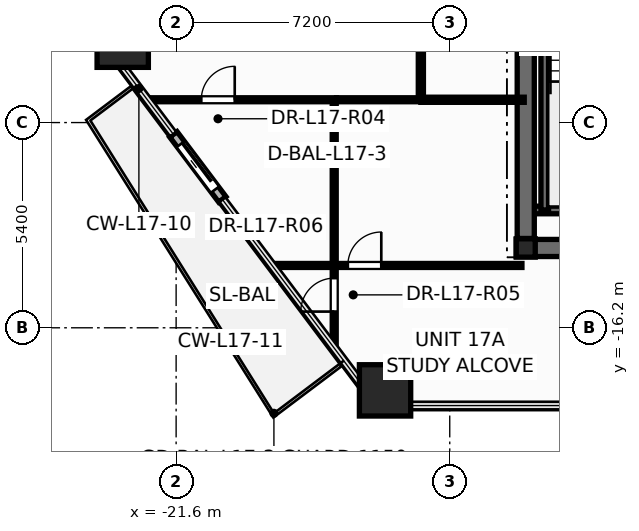
"""IFC4 building model, lengths in metres.
Left out: names, types, materials, properties, quantities, classifications, styles, units other than length and angle.
Written with IfcOpenShell. Run it as: python <this file> out.ifc"""

import sys

from ifc_helpers import new_model, si_unit, direction, frame, frame_2d, origin, origin_2d, place, context, subcontext, project, spatial, rectangle, hollow_rectangle, i_section, extrude, element, fill, save


model = new_model("IFC4")
c1 = context("Model", 3, precision=1e-05, world=origin(), true_north=direction((0.0, 1.0)))
c2 = subcontext(c1, "Body", "Model", "MODEL_VIEW")
j1 = project(units=[si_unit("LENGTHUNIT", "METRE"), si_unit("PLANEANGLEUNIT", "RADIAN")], contexts=[c1])
p1 = place(None, origin())
s1 = spatial("IfcSite", under=j1, at=p1, CompositionType="ELEMENT")
p2 = place(p1, origin())
s2 = spatial("IfcBuilding", under=s1, at=p2, CompositionType="ELEMENT")
p3 = place(p2, frame((0.0, 0.0, 68.4)))
s3 = spatial("IfcBuildingStorey", under=s2, at=p3, CompositionType="ELEMENT", Elevation=68.4)
for number, where, z_axis, x_axis in (
    (1, (-23.005, -8.673, 0.0), (0.0, 0.0, 1.0), (1.0, 0.0, 0.0)),
    (2, (-16.103, -17.847, 0.0), (0.0, 0.0, 1.0), (1.0, 0.0, 0.0)),
):
    element("IfcColumn", number, at=place(p3, frame(where, z_axis=z_axis, x_axis=x_axis)), inside=s3, PredefinedType="COLUMN", context=c2, shape_type="SweptSolid", body=[
        extrude(hollow_rectangle(XDim=1.35, YDim=1.35, WallThickness=0.065, at=origin_2d()), origin(), (0.0, 0.0, 1.0), 3.6),
    ])
p4 = place(p3, frame((-12.4, -14.1, 0.0), z_axis=(0.0, 0.0, 1.0), x_axis=(1.0, 0.0, 0.0)))
e3 = element("IfcColumn", 3, at=p4, inside=s3, PredefinedType="COLUMN", context=c2, shape_type="SweptSolid", body=[
    extrude(i_section(OverallWidth=0.5, OverallDepth=0.482, WebThickness=0.04, FlangeThickness=0.045, at=origin_2d()), origin(), (0.0, 0.0, 1.0), 3.6),
])
p5 = place(p3, frame((-21.671, -11.111, -0.015), z_axis=(0.0, 0.0, 1.0), x_axis=(0.601185740915, -0.799109319756, 0.0)))
e4 = element("IfcWall", 4, at=p5, inside=s3, PredefinedType="STANDARD", context=c2, shape_type="SweptSolid", body=[
    extrude(rectangle(XDim=2.14, YDim=0.24, at=frame_2d((1.07, 0.0))), origin(), (0.0, 0.0, 1.0), 2.728),
])
p6 = place(p5, frame((0.32, 0.0, 0.015)))
e5 = element("IfcOpeningElement", 5, at=p6, cuts=e4, PredefinedType="OPENING", context=c2, shape_type="SweptSolid", body=[
    extrude(rectangle(XDim=1.506, YDim=2.204, at=frame_2d((0.75, 1.102))), frame((0.0, 0.13, 0.0), z_axis=(0.0, -1.0, 0.0), x_axis=(1.0, 0.0, 0.0)), (0.0, 0.0, 1.0), 0.26),
])
p7 = place(p3, frame((-12.65, -14.1, 0.0), z_axis=(0.0, 0.0, 1.0), x_axis=(1.0, 0.0, 0.0)))
e6 = element("IfcWall", 6, at=p7, inside=s3, PredefinedType="SHEAR", context=c2, shape_type="SweptSolid", body=[
    extrude(rectangle(XDim=25.3, YDim=0.45, at=frame_2d((12.65, 0.0))), origin(), (0.0, 0.0, 1.0), 3.6),
])
p8 = place(p3, frame((-12.35, -13.1, 0.0), z_axis=(0.0, 0.0, 1.0), x_axis=(1.0, 0.0, 0.0)))
e7 = element("IfcWall", 7, at=p8, inside=s3, PredefinedType="SOLIDWALL", context=c2, shape_type="SweptSolid", body=[
    extrude(rectangle(XDim=3.87, YDim=0.2, at=frame_2d((1.935, 0.0))), origin(), (0.0, 0.0, 1.0), 3.6),
])
p9 = place(p3, frame((-11.9, -13.1, 0.0), z_axis=(0.0, 0.0, 1.0), x_axis=(0.0, 1.0, 0.0)))
e8 = element("IfcWall", 8, at=p9, inside=s3, PredefinedType="SOLIDWALL", context=c2, shape_type="SweptSolid", body=[
    extrude(rectangle(XDim=7.58, YDim=0.2, at=frame_2d((3.79, 0.0))), origin(), (0.0, 0.0, 1.0), 3.6),
])
p10 = place(p3, frame((-12.4, -13.85, 0.0), z_axis=(0.0, 0.0, 1.0), x_axis=(0.0, 1.0, 0.0)))
e9 = element("IfcWall", 9, at=p10, inside=s3, PredefinedType="SHEAR", context=c2, shape_type="SweptSolid", body=[
    extrude(rectangle(XDim=9.4, YDim=0.45, at=frame_2d((4.7, 0.0))), origin(), (0.0, 0.0, 1.0), 3.6),
])
p11 = place(p3, frame((-19.076, -14.56, 0.0), z_axis=(0.0, 0.0, 1.0), x_axis=(1.0, 0.0, 0.0)))
e10 = element("IfcWall", 10, at=p11, inside=s3, PredefinedType="PARTITIONING", context=c2, shape_type="SweptSolid", body=[
    extrude(rectangle(XDim=6.576, YDim=0.105, at=frame_2d((3.288, 0.0))), origin(), (0.0, 0.0, 1.0), 2.713),
])
p12 = place(p11, frame((1.995, 0.0, 0.0)))
e11 = element("IfcOpeningElement", 11, at=p12, cuts=e10, PredefinedType="OPENING", context=c2, shape_type="SweptSolid", body=[
    extrude(rectangle(XDim=0.886, YDim=2.104, at=frame_2d((0.44, 1.052))), frame((0.0, 0.062, 0.0), z_axis=(0.0, -1.0, 0.0), x_axis=(1.0, 0.0, 0.0)), (0.0, 0.0, 1.0), 0.125),
])
p13 = place(p3, frame((-17.44, -16.734, 0.0), z_axis=(0.0, 0.0, 1.0), x_axis=(0.0, 1.0, 0.0)))
e12 = element("IfcWall", 12, at=p13, inside=s3, PredefinedType="PARTITIONING", context=c2, shape_type="SweptSolid", body=[
    extrude(rectangle(XDim=6.534, YDim=0.105, at=frame_2d((3.267, 0.0))), origin(), (0.0, 0.0, 1.0), 2.713),
])
p14 = place(p13, frame((0.961, 0.0, 0.0)))
e13 = element("IfcOpeningElement", 13, at=p14, cuts=e12, PredefinedType="OPENING", context=c2, shape_type="SweptSolid", body=[
    extrude(rectangle(XDim=0.886, YDim=2.104, at=frame_2d((0.44, 1.052))), frame((0.0, 0.062, 0.0), z_axis=(0.0, -1.0, 0.0), x_axis=(1.0, 0.0, 0.0)), (0.0, 0.0, 1.0), 0.125),
])
p15 = place(p3, frame((-22.357, -10.2, 0.0), z_axis=(0.0, 0.0, 1.0), x_axis=(1.0, 0.0, 0.0)))
e14 = element("IfcWall", 14, at=p15, inside=s3, PredefinedType="PARTITIONING", context=c2, shape_type="SweptSolid", body=[
    extrude(rectangle(XDim=4.977, YDim=0.105, at=frame_2d((2.488, 0.0))), origin(), (0.0, 0.0, 1.0), 2.713),
])
p16 = place(p15, frame((1.419, 0.0, 0.0)))
e15 = element("IfcOpeningElement", 15, at=p16, cuts=e14, PredefinedType="OPENING", context=c2, shape_type="SweptSolid", body=[
    extrude(rectangle(XDim=0.886, YDim=2.104, at=frame_2d((0.44, 1.052))), frame((0.0, 0.062, 0.0), z_axis=(0.0, -1.0, 0.0), x_axis=(1.0, 0.0, 0.0)), (0.0, 0.0, 1.0), 0.125),
])
p17 = place(p3, frame((-15.16, -10.2, 0.0), z_axis=(0.0, 0.0, 1.0), x_axis=(0.0, 1.0, 0.0)))
e16 = element("IfcWall", 16, at=p17, inside=s3, PredefinedType="PARTITIONING", context=c2, shape_type="SweptSolid", body=[
    extrude(rectangle(XDim=2.76, YDim=0.135, at=frame_2d((1.38, 0.0))), origin(), (0.0, 0.0, 1.0), 3.35),
])
p18 = place(p3, frame((-15.16, -10.2, 0.0), z_axis=(0.0, 0.0, 1.0), x_axis=(1.0, 0.0, 0.0)))
e17 = element("IfcWall", 17, at=p18, inside=s3, PredefinedType="PARTITIONING", context=c2, shape_type="SweptSolid", body=[
    extrude(rectangle(XDim=2.72, YDim=0.135, at=frame_2d((1.36, 0.0))), origin(), (0.0, 0.0, 1.0), 2.713),
])
p19 = place(p3, frame((-17.378, -10.2, 0.0), z_axis=(0.0, 0.0, 1.0), x_axis=(1.0, 0.0, 0.0)))
e18 = element("IfcWall", 18, at=p19, inside=s3, PredefinedType="PARTITIONING", context=c2, shape_type="SweptSolid", body=[
    extrude(rectangle(XDim=2.218, YDim=0.105, at=frame_2d((1.109, 0.0))), origin(), (0.0, 0.0, 1.0), 3.35),
])
p20 = place(p6, origin())
e19 = element("IfcDoor", 19, at=p20, inside=s3, OperationType="SLIDING_TO_RIGHT", PredefinedType="DOOR", context=c2, shape_type="SweptSolid", body=[
    extrude(rectangle(XDim=1.5, YDim=2.2, at=frame_2d((0.75, 1.1))), frame((0.0, 0.025, 0.0), z_axis=(0.0, -1.0, 0.0), x_axis=(1.0, 0.0, 0.0)), (0.0, 0.0, 1.0), 0.05),
])
fill(e5, e19)
p21 = place(p16, origin())
e20 = element("IfcDoor", 20, at=p21, inside=s3, OperationType="SINGLE_SWING_RIGHT", PredefinedType="DOOR", context=c2, shape_type="SweptSolid", body=[
    extrude(rectangle(XDim=0.88, YDim=2.1, at=frame_2d((0.44, 1.05))), frame((0.0, 0.025, 0.0), z_axis=(0.0, -1.0, 0.0), x_axis=(1.0, 0.0, 0.0)), (0.0, 0.0, 1.0), 0.05),
])
fill(e15, e20)
p22 = place(p14, origin())
e21 = element("IfcDoor", 21, at=p22, inside=s3, OperationType="SINGLE_SWING_LEFT", PredefinedType="DOOR", context=c2, shape_type="SweptSolid", body=[
    extrude(rectangle(XDim=0.88, YDim=2.1, at=frame_2d((0.44, 1.05))), frame((0.0, 0.025, 0.0), z_axis=(0.0, -1.0, 0.0), x_axis=(1.0, 0.0, 0.0)), (0.0, 0.0, 1.0), 0.05),
])
fill(e13, e21)
p23 = place(p12, origin())
e22 = element("IfcDoor", 22, at=p23, inside=s3, OperationType="SINGLE_SWING_RIGHT", PredefinedType="DOOR", context=c2, shape_type="SweptSolid", body=[
    extrude(rectangle(XDim=0.88, YDim=2.1, at=frame_2d((0.44, 1.05))), frame((0.0, 0.025, 0.0), z_axis=(0.0, -1.0, 0.0), x_axis=(1.0, 0.0, 0.0)), (0.0, 0.0, 1.0), 0.05),
])
fill(e11, e22)
save(model, sys.argv[1])
